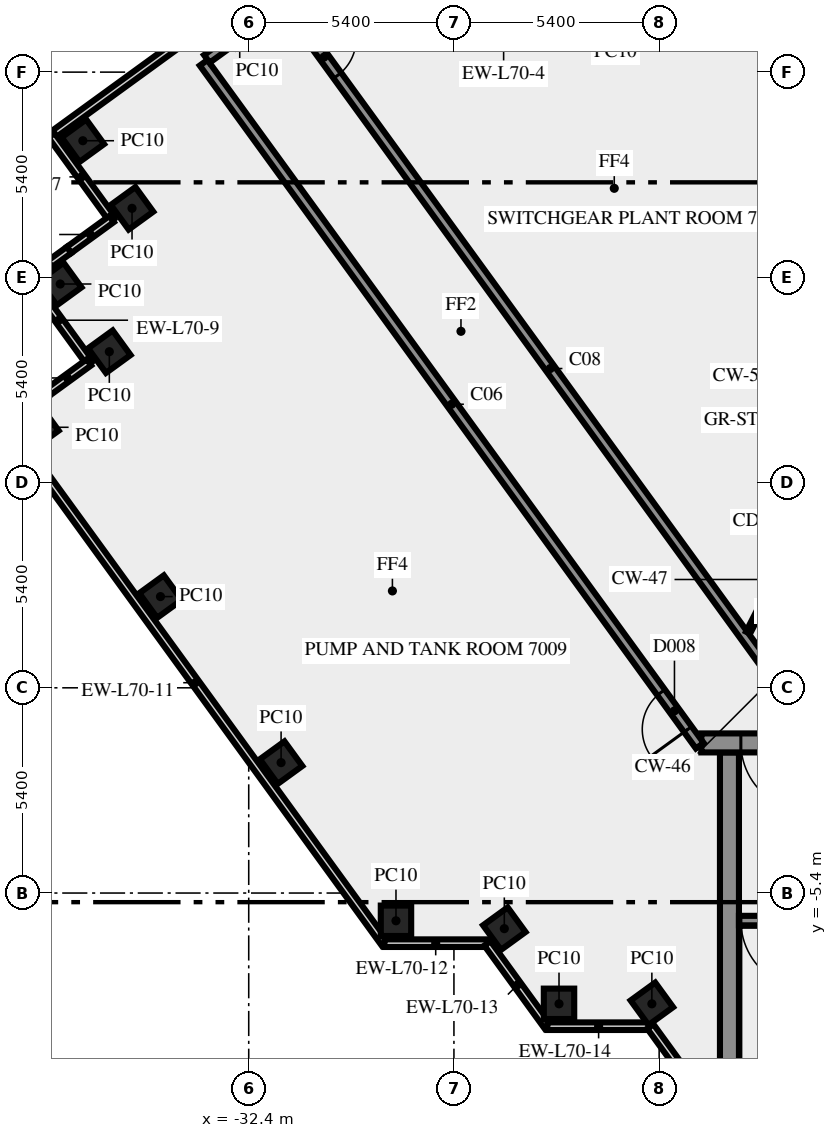
"""IFC4 building model, lengths in metres.
Left out: names, types, materials, properties, quantities, classifications, styles, units other than length and angle.
Written with IfcOpenShell. Run it as: python <this file> out.ifc"""

import sys

from ifc_helpers import new_model, si_unit, direction, frame, frame_2d, origin, origin_2d, place, context, subcontext, project, spatial, rectangle, extrude, element, fill, save


model = new_model("IFC4")
c1 = context("Model", 3, precision=1e-05, world=origin(), true_north=direction((0.0, 1.0)))
c2 = subcontext(c1, "Body", "Model", "MODEL_VIEW")
j1 = project(units=[si_unit("LENGTHUNIT", "METRE"), si_unit("PLANEANGLEUNIT", "RADIAN")], contexts=[c1])
p1 = place(None, origin())
s1 = spatial("IfcSite", under=j1, at=p1, CompositionType="ELEMENT")
p2 = place(p1, origin())
s2 = spatial("IfcBuilding", under=s1, at=p2, CompositionType="ELEMENT")
p3 = place(p2, frame((0.0, 0.0, 301.0)))
s3 = spatial("IfcBuildingStorey", under=s2, at=p3, CompositionType="ELEMENT", Elevation=301.0)
for number, where, z_axis, x_axis in (
    (1, (-36.765, 14.395, 0.0), (0.0, 0.0, 1.0), (0.588, -0.809, 0.0)),
    (2, (-35.471, 12.616, 0.0), (0.0, 0.0, 1.0), (-0.809, -0.588, 0.0)),
    (3, (-37.36, 10.625, 0.0), (0.0, 0.0, 1.0), (0.588, -0.809, 0.0)),
    (4, (-36.068, 8.844, 0.0), (0.0, 0.0, 1.0), (0.588, -0.809, 0.0)),
    (5, (-37.96, 6.855, 0.0), (0.0, 0.0, 1.0), (0.588, -0.809, 0.0)),
    (6, (-34.722, 2.4, 0.0), (0.0, 0.0, 1.0), (0.588, -0.809, 0.0)),
    (7, (-31.548, -1.969, 0.0), (0.0, 0.0, 1.0), (0.588, -0.809, 0.0)),
    (8, (-28.525, -6.13, 0.0), (0.0, 0.0, 1.0), (1.0, 0.0, 0.0)),
    (9, (-25.674, -6.337, 0.0), (0.0, 0.0, 1.0), (0.588, -0.809, 0.0)),
    (10, (-24.235, -8.315, 0.0), (0.0, 0.0, 1.0), (1.0, 0.0, 0.0)),
    (11, (-21.792, -8.315, 0.0), (0.0, 0.0, 1.0), (0.588, -0.809, 0.0)),
):
    element("IfcColumn", number, at=place(p3, frame(where, z_axis=z_axis, x_axis=x_axis)), inside=s3, PredefinedType="COLUMN", context=c2, shape_type="SweptSolid", body=[
        extrude(rectangle(XDim=0.8, YDim=0.8, at=origin_2d()), origin(), (0.0, 0.0, 1.0), 5.65),
    ])
p4 = place(p3, frame((-14.354, 11.093, 0.0), z_axis=(0.0, 0.0, 1.0), x_axis=(-0.58779571445, 0.809009393069, 0.0)))
e12 = element("IfcWall", 12, at=p4, inside=s3, PredefinedType="SOLIDWALL", context=c2, shape_type="SweptSolid", body=[
    extrude(rectangle(XDim=11.044, YDim=0.2, at=frame_2d((5.522, 0.0))), origin(), (0.0, 0.0, 1.0), 5.65),
])
p5 = place(p3, frame((-28.372, 21.22, 0.0), z_axis=(0.0, 0.0, 1.0), x_axis=(-0.809023074878, -0.587776883106, 0.0)))
e13 = element("IfcWall", 13, at=p5, inside=s3, PredefinedType="SOLIDWALL", context=c2, shape_type="SweptSolid", body=[
    extrude(rectangle(XDim=11.4, YDim=0.2, at=frame_2d((5.7, 0.0))), origin(), (0.0, 0.0, 1.0), 5.65),
])
p6 = place(p3, frame((-37.592, 14.536, 0.0), z_axis=(0.0, 0.0, 1.0), x_axis=(0.587762999008, -0.809033161865, 0.0)))
e14 = element("IfcWall", 14, at=p6, inside=s3, PredefinedType="SOLIDWALL", context=c2, shape_type="SweptSolid", body=[
    extrude(rectangle(XDim=2.7, YDim=0.2, at=frame_2d((1.35, 0.0))), origin(), (0.0, 0.0, 1.0), 5.65),
])
p7 = place(p3, frame((-36.007, 12.335, 0.0), z_axis=(0.0, 0.0, 1.0), x_axis=(-0.809078659976, -0.58770036751, 0.0)))
e15 = element("IfcWall", 15, at=p7, inside=s3, PredefinedType="SOLIDWALL", context=c2, shape_type="SweptSolid", body=[
    extrude(rectangle(XDim=1.386, YDim=0.2, at=frame_2d((0.693, 0.0))), origin(), (0.0, 0.0, 1.0), 4.15),
])
p8 = place(p3, frame((-37.129, 11.52, 0.0), z_axis=(0.0, 0.0, 1.0), x_axis=(-0.808985145084, -0.587829086584, 0.0)))
e16 = element("IfcWall", 16, at=p8, inside=s3, PredefinedType="SOLIDWALL", context=c2, shape_type="SweptSolid", body=[
    extrude(rectangle(XDim=1.314, YDim=0.2, at=frame_2d((0.657, 0.0))), origin(), (0.0, 0.0, 1.0), 5.65),
])
p9 = place(p3, frame((-38.189, 10.765, 0.0), z_axis=(0.0, 0.0, 1.0), x_axis=(0.587822180636, -0.808990163075, 0.0)))
e17 = element("IfcWall", 17, at=p9, inside=s3, PredefinedType="SOLIDWALL", context=c2, shape_type="SweptSolid", body=[
    extrude(rectangle(XDim=2.7, YDim=0.2, at=frame_2d((1.35, 0.0))), origin(), (0.0, 0.0, 1.0), 5.65),
])
p10 = place(p3, frame((-36.605, 8.563, 0.0), z_axis=(0.0, 0.0, 1.0), x_axis=(-0.808970345434, -0.587849453694, 0.0)))
e18 = element("IfcWall", 18, at=p10, inside=s3, PredefinedType="SOLIDWALL", context=c2, shape_type="SweptSolid", body=[
    extrude(rectangle(XDim=1.397, YDim=0.2, at=frame_2d((0.698, 0.0))), origin(), (0.0, 0.0, 1.0), 4.15),
])
p11 = place(p3, frame((-38.786, 6.993, 0.0), z_axis=(0.0, 0.0, 1.0), x_axis=(0.587789790223, -0.809013697356, 0.0)))
e19 = element("IfcWall", 19, at=p11, inside=s3, PredefinedType="SOLIDWALL", context=c2, shape_type="SweptSolid", body=[
    extrude(rectangle(XDim=16.956, YDim=0.2, at=frame_2d((8.478, 0.0))), origin(), (0.0, 0.0, 1.0), 5.65),
])
p12 = place(p3, frame((-28.83, -6.719, 0.0), z_axis=(0.0, 0.0, 1.0), x_axis=(1.0, 0.0, 0.0)))
e20 = element("IfcWall", 20, at=p12, inside=s3, PredefinedType="SOLIDWALL", context=c2, shape_type="SweptSolid", body=[
    extrude(rectangle(XDim=2.7, YDim=0.2, at=frame_2d((1.35, 0.0))), origin(), (0.0, 0.0, 1.0), 5.65),
])
p13 = place(p3, frame((-26.12, -6.724, 0.0), z_axis=(0.0, 0.0, 1.0), x_axis=(0.587720002413, -0.809064397168, 0.0)))
e21 = element("IfcWall", 21, at=p13, inside=s3, PredefinedType="SOLIDWALL", context=c2, shape_type="SweptSolid", body=[
    extrude(rectangle(XDim=2.7, YDim=0.2, at=frame_2d((1.35, 0.0))), origin(), (0.0, 0.0, 1.0), 5.65),
])
p14 = place(p3, frame((-24.543, -8.904, 0.0), z_axis=(0.0, 0.0, 1.0), x_axis=(1.0, 0.0, 0.0)))
e22 = element("IfcWall", 22, at=p14, inside=s3, PredefinedType="SOLIDWALL", context=c2, shape_type="SweptSolid", body=[
    extrude(rectangle(XDim=2.7, YDim=0.2, at=frame_2d((1.35, 0.0))), origin(), (0.0, 0.0, 1.0), 5.65),
])
p15 = place(p3, frame((-21.833, -8.909, 0.0), z_axis=(0.0, 0.0, 1.0), x_axis=(0.587766567315, -0.809030569476, 0.0)))
e23 = element("IfcWall", 23, at=p15, inside=s3, PredefinedType="SOLIDWALL", context=c2, shape_type="SweptSolid", body=[
    extrude(rectangle(XDim=2.688, YDim=0.2, at=frame_2d((1.344, 0.0))), origin(), (0.0, 0.0, 1.0), 5.65),
])
p16 = place(p3, frame((-19.75, -10.5, 0.0), z_axis=(0.0, 0.0, 1.0), x_axis=(0.0, 1.0, 0.0)))
e24 = element("IfcWall", 24, at=p16, inside=s3, PredefinedType="SHEAR", context=c2, shape_type="SweptSolid", body=[
    extrude(rectangle(XDim=8.8, YDim=0.5, at=frame_2d((4.4, 0.0))), origin(), (0.0, 0.0, 1.0), 5.65),
])
p17 = place(p3, frame((-11.45, -6.125, 0.0), z_axis=(0.0, 0.0, 1.0), x_axis=(-1.0, 0.0, 0.0)))
e25 = element("IfcWall", 25, at=p17, inside=s3, PredefinedType="SHEAR", context=c2, shape_type="SweptSolid", body=[
    extrude(rectangle(XDim=8.05, YDim=0.25, at=frame_2d((4.025, 0.0))), origin(), (0.0, 0.0, 1.0), 5.65),
])
p18 = place(p17, frame((6.2, 0.0, 0.0)))
e26 = element("IfcOpeningElement", 26, at=p18, cuts=e25, PredefinedType="OPENING", context=c2, shape_type="SweptSolid", body=[
    extrude(rectangle(XDim=1.8, YDim=2.1, at=frame_2d((0.9, 1.05))), frame((0.0, 0.135, 0.0), z_axis=(0.0, -1.0, 0.0), x_axis=(1.0, 0.0, 0.0)), (0.0, 0.0, 1.0), 0.27),
])
p19 = place(p3, frame((20.49, -1.45, 0.0), z_axis=(0.0, 0.0, 1.0), x_axis=(-1.0, 0.0, 0.0)))
e27 = element("IfcWall", 27, at=p19, inside=s3, PredefinedType="SHEAR", context=c2, shape_type="SweptSolid", body=[
    extrude(rectangle(XDim=40.98, YDim=0.5, at=frame_2d((20.49, 0.0))), origin(), (0.0, 0.0, 1.0), 5.65),
])
p20 = place(p19, frame((38.14, 0.0, 0.0)))
e28 = element("IfcOpeningElement", 28, at=p20, cuts=e27, PredefinedType="OPENING", context=c2, shape_type="SweptSolid", body=[
    extrude(rectangle(XDim=1.8, YDim=2.1, at=frame_2d((0.9, 1.05))), frame((0.0, 0.26, 0.0), z_axis=(0.0, -1.0, 0.0), x_axis=(1.0, 0.0, 0.0)), (0.0, 0.0, 1.0), 0.52),
])
p21 = place(p19, frame((35.89, 0.0, 0.0)))
e29 = element("IfcOpeningElement", 29, at=p21, cuts=e27, PredefinedType="OPENING", context=c2, shape_type="SweptSolid", body=[
    extrude(rectangle(XDim=0.9, YDim=2.1, at=frame_2d((0.45, 1.05))), frame((0.0, 0.26, 0.0), z_axis=(0.0, -1.0, 0.0), x_axis=(1.0, 0.0, 0.0)), (0.0, 0.0, 1.0), 0.52),
])
p22 = place(p19, frame((32.94, 0.0, 0.0)))
e30 = element("IfcOpeningElement", 30, at=p22, cuts=e27, PredefinedType="OPENING", context=c2, shape_type="SweptSolid", body=[
    extrude(rectangle(XDim=0.9, YDim=2.1, at=frame_2d((0.45, 1.05))), frame((0.0, 0.26, 0.0), z_axis=(0.0, -1.0, 0.0), x_axis=(1.0, 0.0, 0.0)), (0.0, 0.0, 1.0), 0.52),
])
p23 = place(p19, frame((21.765, 0.0, 0.0)))
e31 = element("IfcOpeningElement", 31, at=p23, cuts=e27, PredefinedType="OPENING", context=c2, shape_type="SweptSolid", body=[
    extrude(rectangle(XDim=2.0, YDim=2.1, at=frame_2d((1.0, 1.05))), frame((0.0, 0.26, 0.0), z_axis=(0.0, -1.0, 0.0), x_axis=(1.0, 0.0, 0.0)), (0.0, 0.0, 1.0), 0.52),
])
p24 = place(p19, frame((14.903, 0.0, 0.0)))
e32 = element("IfcOpeningElement", 32, at=p24, cuts=e27, PredefinedType="OPENING", context=c2, shape_type="SweptSolid", body=[
    extrude(rectangle(XDim=0.9, YDim=2.1, at=frame_2d((0.45, 1.05))), frame((0.0, 0.26, 0.0), z_axis=(0.0, -1.0, 0.0), x_axis=(1.0, 0.0, 0.0)), (0.0, 0.0, 1.0), 0.52),
])
p25 = place(p19, frame((12.54, 0.0, 0.0)))
e33 = element("IfcOpeningElement", 33, at=p25, cuts=e27, PredefinedType="OPENING", context=c2, shape_type="SweptSolid", body=[
    extrude(rectangle(XDim=0.9, YDim=2.1, at=frame_2d((0.45, 1.05))), frame((0.0, 0.26, 0.0), z_axis=(0.0, -1.0, 0.0), x_axis=(1.0, 0.0, 0.0)), (0.0, 0.0, 1.0), 0.52),
])
p26 = place(p19, frame((9.877, 0.0, 0.0)))
e34 = element("IfcOpeningElement", 34, at=p26, cuts=e27, PredefinedType="OPENING", context=c2, shape_type="SweptSolid", body=[
    extrude(rectangle(XDim=0.9, YDim=2.1, at=frame_2d((0.45, 1.05))), frame((0.0, 0.26, 0.0), z_axis=(0.0, -1.0, 0.0), x_axis=(1.0, 0.0, 0.0)), (0.0, 0.0, 1.0), 0.52),
])
p27 = place(p19, frame((7.14, 0.0, 0.0)))
e35 = element("IfcOpeningElement", 35, at=p27, cuts=e27, PredefinedType="OPENING", context=c2, shape_type="SweptSolid", body=[
    extrude(rectangle(XDim=0.9, YDim=2.1, at=frame_2d((0.45, 1.05))), frame((0.0, 0.26, 0.0), z_axis=(0.0, -1.0, 0.0), x_axis=(1.0, 0.0, 0.0)), (0.0, 0.0, 1.0), 0.52),
])
p28 = place(p19, frame((5.028, 0.0, 0.0)))
e36 = element("IfcOpeningElement", 36, at=p28, cuts=e27, PredefinedType="OPENING", context=c2, shape_type="SweptSolid", body=[
    extrude(rectangle(XDim=0.8, YDim=2.1, at=frame_2d((0.4, 1.05))), frame((0.0, 0.26, 0.0), z_axis=(0.0, -1.0, 0.0), x_axis=(1.0, 0.0, 0.0)), (0.0, 0.0, 1.0), 0.52),
])
p29 = place(p19, frame((3.452, 0.0, 0.0)))
e37 = element("IfcOpeningElement", 37, at=p29, cuts=e27, PredefinedType="OPENING", context=c2, shape_type="SweptSolid", body=[
    extrude(rectangle(XDim=0.8, YDim=2.1, at=frame_2d((0.4, 1.05))), frame((0.0, 0.26, 0.0), z_axis=(0.0, -1.0, 0.0), x_axis=(1.0, 0.0, 0.0)), (0.0, 0.0, 1.0), 0.52),
])
p30 = place(p19, frame((1.04, 0.0, 0.0)))
e38 = element("IfcOpeningElement", 38, at=p30, cuts=e27, PredefinedType="OPENING", context=c2, shape_type="SweptSolid", body=[
    extrude(rectangle(XDim=1.8, YDim=2.1, at=frame_2d((0.9, 1.05))), frame((0.0, 0.26, 0.0), z_axis=(0.0, -1.0, 0.0), x_axis=(1.0, 0.0, 0.0)), (0.0, 0.0, 1.0), 0.52),
])
p31 = place(p3, frame((-20.531, -1.523, 0.0), z_axis=(0.0, 0.0, 1.0), x_axis=(-0.587782114023, 0.809019274452, 0.0)))
e39 = element("IfcWall", 39, at=p31, inside=s3, PredefinedType="SOLIDWALL", context=c2, shape_type="SweptSolid", body=[
    extrude(rectangle(XDim=22.212, YDim=0.25, at=frame_2d((11.106, 0.0))), origin(), (0.0, 0.0, 1.0), 5.65),
])
p32 = place(p31, frame((0.533, 0.0, 0.0)))
e40 = element("IfcOpeningElement", 40, at=p32, cuts=e39, PredefinedType="OPENING", context=c2, shape_type="SweptSolid", body=[
    extrude(rectangle(XDim=1.2, YDim=2.1, at=frame_2d((0.6, 1.05))), frame((0.0, 0.135, 0.0), z_axis=(0.0, -1.0, 0.0), x_axis=(1.0, 0.0, 0.0)), (0.0, 0.0, 1.0), 0.27),
])
p33 = place(p3, frame((-33.502, 16.549, 0.0), z_axis=(0.0, 0.0, 1.0), x_axis=(0.809045768422, 0.587745646176, 0.0)))
e41 = element("IfcWall", 41, at=p33, inside=s3, PredefinedType="SOLIDWALL", context=c2, shape_type="SweptSolid", body=[
    extrude(rectangle(XDim=2.488, YDim=0.25, at=frame_2d((1.244, 0.0))), origin(), (0.0, 0.0, 1.0), 5.65),
])
p34 = place(p3, frame((-31.387, 17.927, 0.0), z_axis=(0.0, 0.0, 1.0), x_axis=(0.587788830132, -0.80901439491, 0.0)))
e42 = element("IfcWall", 42, at=p34, inside=s3, PredefinedType="SOLIDWALL", context=c2, shape_type="SweptSolid", body=[
    extrude(rectangle(XDim=23.549, YDim=0.25, at=frame_2d((11.775, 0.0))), origin(), (0.0, 0.0, 1.0), 5.65),
])
p35 = place(p34, frame((1.046, 0.0, 0.0)))
e43 = element("IfcOpeningElement", 43, at=p35, cuts=e42, PredefinedType="OPENING", context=c2, shape_type="SweptSolid", body=[
    extrude(rectangle(XDim=1.2, YDim=2.1, at=frame_2d((0.6, 1.05))), frame((0.0, 0.135, 0.0), z_axis=(0.0, -1.0, 0.0), x_axis=(1.0, 0.0, 0.0)), (0.0, 0.0, 1.0), 0.27),
])
p36 = place(p3, frame((-19.261, 1.45, 0.0), z_axis=(0.0, 0.0, 1.0), x_axis=(0.453950796792, 0.891026752736, 0.0)))
e44 = element("IfcWall", 44, at=p36, inside=s3, PredefinedType="PARTITIONING", context=c2, shape_type="SweptSolid", body=[
    extrude(rectangle(XDim=2.778, YDim=0.12, at=frame_2d((1.389, 0.0))), origin(), (0.0, 0.0, 1.0), 5.65),
])
p37 = place(p18, origin())
e45 = element("IfcDoor", 45, at=p37, inside=s3, OperationType="DOUBLE_DOOR_SINGLE_SWING", PredefinedType="DOOR", context=c2, shape_type="SweptSolid", body=[
    extrude(rectangle(XDim=1.8, YDim=2.1, at=frame_2d((0.9, 1.05))), frame((0.0, 0.025, 0.0), z_axis=(0.0, -1.0, 0.0), x_axis=(1.0, 0.0, 0.0)), (0.0, 0.0, 1.0), 0.05),
])
fill(e26, e45)
p38 = place(p20, origin())
e46 = element("IfcDoor", 46, at=p38, inside=s3, OperationType="DOUBLE_DOOR_SINGLE_SWING", PredefinedType="DOOR", context=c2, shape_type="SweptSolid", body=[
    extrude(rectangle(XDim=1.8, YDim=2.1, at=frame_2d((0.9, 1.05))), frame((0.0, 0.025, 0.0), z_axis=(0.0, -1.0, 0.0), x_axis=(1.0, 0.0, 0.0)), (0.0, 0.0, 1.0), 0.05),
])
fill(e28, e46)
p39 = place(p32, origin())
e47 = element("IfcDoor", 47, at=p39, inside=s3, OperationType="SINGLE_SWING_LEFT", PredefinedType="DOOR", context=c2, shape_type="SweptSolid", body=[
    extrude(rectangle(XDim=1.2, YDim=2.1, at=frame_2d((0.6, 1.05))), frame((0.0, 0.025, 0.0), z_axis=(0.0, -1.0, 0.0), x_axis=(1.0, 0.0, 0.0)), (0.0, 0.0, 1.0), 0.05),
])
fill(e40, e47)
p40 = place(p35, origin())
e48 = element("IfcDoor", 48, at=p40, inside=s3, OperationType="SINGLE_SWING_LEFT", PredefinedType="DOOR", context=c2, shape_type="SweptSolid", body=[
    extrude(rectangle(XDim=1.2, YDim=2.1, at=frame_2d((0.6, 1.05))), frame((0.0, 0.025, 0.0), z_axis=(0.0, -1.0, 0.0), x_axis=(1.0, 0.0, 0.0)), (0.0, 0.0, 1.0), 0.05),
])
fill(e43, e48)
save(model, sys.argv[1])
